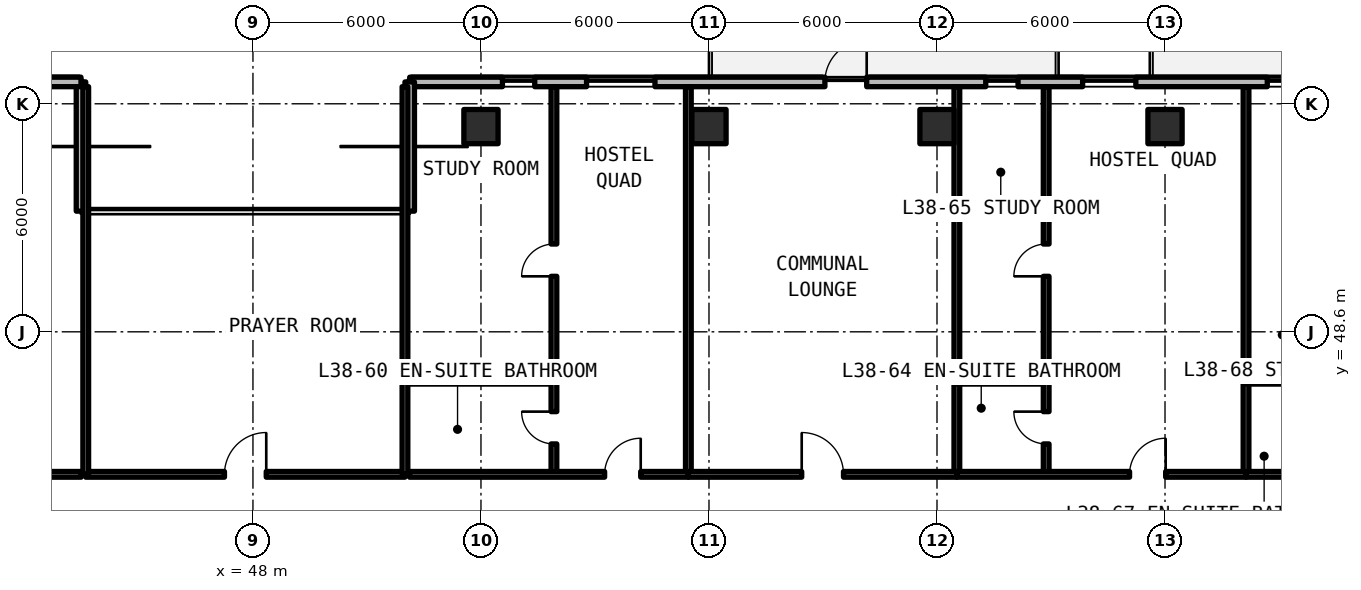
"""IFC4 building model, lengths in metres.
Left out: names, types, materials, properties, quantities, classifications, styles, units other than length and angle.
Written with IfcOpenShell. Run it as: python <this file> out.ifc"""

import sys

from ifc_helpers import new_model, si_unit, direction, frame, frame_2d, origin, origin_2d, place, context, subcontext, project, spatial, rectangle, extrude, element, fill, save


model = new_model("IFC4")
c1 = context("Model", 3, precision=1e-05, world=origin(), true_north=direction((0.0, 1.0)))
c2 = subcontext(c1, "Body", "Model", "MODEL_VIEW")
j1 = project(units=[si_unit("LENGTHUNIT", "METRE"), si_unit("PLANEANGLEUNIT", "RADIAN")], contexts=[c1])
p1 = place(None, origin())
s1 = spatial("IfcSite", under=j1, at=p1, CompositionType="ELEMENT")
p2 = place(p1, origin())
s2 = spatial("IfcBuilding", under=s1, at=p2, CompositionType="ELEMENT")
p3 = place(p2, frame((0.0, 0.0, 138.6)))
s3 = spatial("IfcBuildingStorey", under=s2, at=p3, CompositionType="ELEMENT", Elevation=138.6)
for number, where, z_axis, x_axis in (
    (1, (54.0, 54.0, 0.0), (0.0, 0.0, 1.0), (1.0, 0.0, 0.0)),
    (2, (60.0, 54.0, 0.0), (0.0, 0.0, 1.0), (1.0, 0.0, 0.0)),
    (3, (66.0, 54.0, 0.0), (0.0, 0.0, 1.0), (1.0, 0.0, 0.0)),
    (4, (72.0, 54.0, 0.0), (0.0, 0.0, 1.0), (1.0, 0.0, 0.0)),
):
    element("IfcColumn", number, at=place(p3, frame(where, z_axis=z_axis, x_axis=x_axis)), inside=s3, PredefinedType="COLUMN", context=c2, shape_type="SweptSolid", body=[
        extrude(rectangle(XDim=0.9, YDim=0.9, at=origin_2d()), origin(), (0.0, 0.0, 1.0), 3.3),
    ])
p4 = place(p3, frame((95.748, 55.175, 0.0), z_axis=(0.0, 0.0, 1.0), x_axis=(-1.0, 0.0, 0.0)))
e5 = element("IfcWall", 5, at=p4, inside=s3, PredefinedType="SOLIDWALL", context=c2, shape_type="SweptSolid", body=[
    extrude(rectangle(XDim=43.623, YDim=0.25, at=frame_2d((21.812, 0.0))), origin(), (0.0, 0.0, 1.0), 3.08),
])
p5 = place(p4, frame((31.598, 0.0, 0.0)))
e6 = element("IfcOpeningElement", 6, at=p5, cuts=e5, PredefinedType="OPENING", context=c2, shape_type="SweptSolid", body=[
    extrude(rectangle(XDim=1.1, YDim=2.15, at=frame_2d((0.55, 1.075))), frame((0.0, 0.135, 0.0), z_axis=(0.0, -1.0, 0.0), x_axis=(1.0, 0.0, 0.0)), (0.0, 0.0, 1.0), 0.27),
])
p6 = place(p4, frame((15.398, 0.0, 0.0)))
e7 = element("IfcOpeningElement", 7, at=p6, cuts=e5, PredefinedType="OPENING", context=c2, shape_type="SweptSolid", body=[
    extrude(rectangle(XDim=1.1, YDim=2.15, at=frame_2d((0.55, 1.075))), frame((0.0, 0.135, 0.0), z_axis=(0.0, -1.0, 0.0), x_axis=(1.0, 0.0, 0.0)), (0.0, 0.0, 1.0), 0.27),
])
p7 = place(p4, frame((40.333, 0.0, 0.78)))
e8 = element("IfcOpeningElement", 8, at=p7, cuts=e5, PredefinedType="OPENING", context=c2, shape_type="SweptSolid", body=[
    extrude(rectangle(XDim=0.85, YDim=1.65, at=frame_2d((0.425, 0.825))), frame((0.0, 0.135, 0.0), z_axis=(0.0, -1.0, 0.0), x_axis=(1.0, 0.0, 0.0)), (0.0, 0.0, 1.0), 0.27),
])
p8 = place(p4, frame((37.17, 0.0, 0.78)))
e9 = element("IfcOpeningElement", 9, at=p8, cuts=e5, PredefinedType="OPENING", context=c2, shape_type="SweptSolid", body=[
    extrude(rectangle(XDim=1.8, YDim=1.66, at=frame_2d((0.9, 0.83))), frame((0.0, 0.135, 0.0), z_axis=(0.0, -1.0, 0.0), x_axis=(1.0, 0.0, 0.0)), (0.0, 0.0, 1.0), 0.27),
])
p9 = place(p4, frame((27.615, 0.0, 0.78)))
e10 = element("IfcOpeningElement", 10, at=p9, cuts=e5, PredefinedType="OPENING", context=c2, shape_type="SweptSolid", body=[
    extrude(rectangle(XDim=0.85, YDim=1.65, at=frame_2d((0.425, 0.825))), frame((0.0, 0.135, 0.0), z_axis=(0.0, -1.0, 0.0), x_axis=(1.0, 0.0, 0.0)), (0.0, 0.0, 1.0), 0.27),
])
p10 = place(p4, frame((24.516, 0.0, 0.78)))
e11 = element("IfcOpeningElement", 11, at=p10, cuts=e5, PredefinedType="OPENING", context=c2, shape_type="SweptSolid", body=[
    extrude(rectangle(XDim=1.4, YDim=1.65, at=frame_2d((0.7, 0.825))), frame((0.0, 0.135, 0.0), z_axis=(0.0, -1.0, 0.0), x_axis=(1.0, 0.0, 0.0)), (0.0, 0.0, 1.0), 0.27),
])
p11 = place(p4, frame((20.208, 0.0, 0.78)))
e12 = element("IfcOpeningElement", 12, at=p11, cuts=e5, PredefinedType="OPENING", context=c2, shape_type="SweptSolid", body=[
    extrude(rectangle(XDim=0.85, YDim=1.65, at=frame_2d((0.425, 0.825))), frame((0.0, 0.135, 0.0), z_axis=(0.0, -1.0, 0.0), x_axis=(1.0, 0.0, 0.0)), (0.0, 0.0, 1.0), 0.27),
])
p12 = place(p4, frame((12.6, 0.0, 0.78)))
e13 = element("IfcOpeningElement", 13, at=p12, cuts=e5, PredefinedType="OPENING", context=c2, shape_type="SweptSolid", body=[
    extrude(rectangle(XDim=1.4, YDim=1.65, at=frame_2d((0.7, 0.825))), frame((0.0, 0.135, 0.0), z_axis=(0.0, -1.0, 0.0), x_axis=(1.0, 0.0, 0.0)), (0.0, 0.0, 1.0), 0.27),
])
p13 = place(p4, frame((7.831, 0.0, 0.78)))
e14 = element("IfcOpeningElement", 14, at=p13, cuts=e5, PredefinedType="OPENING", context=c2, shape_type="SweptSolid", body=[
    extrude(rectangle(XDim=1.4, YDim=1.65, at=frame_2d((0.7, 0.825))), frame((0.0, 0.135, 0.0), z_axis=(0.0, -1.0, 0.0), x_axis=(1.0, 0.0, 0.0)), (0.0, 0.0, 1.0), 0.27),
])
p14 = place(p4, frame((4.286, 0.0, 0.78)))
e15 = element("IfcOpeningElement", 15, at=p14, cuts=e5, PredefinedType="OPENING", context=c2, shape_type="SweptSolid", body=[
    extrude(rectangle(XDim=0.85, YDim=1.65, at=frame_2d((0.425, 0.825))), frame((0.0, 0.135, 0.0), z_axis=(0.0, -1.0, 0.0), x_axis=(1.0, 0.0, 0.0)), (0.0, 0.0, 1.0), 0.27),
])
p15 = place(p4, frame((1.098, 0.0, 0.78)))
e16 = element("IfcOpeningElement", 16, at=p15, cuts=e5, PredefinedType="OPENING", context=c2, shape_type="SweptSolid", body=[
    extrude(rectangle(XDim=1.8, YDim=1.66, at=frame_2d((0.9, 0.83))), frame((0.0, 0.135, 0.0), z_axis=(0.0, -1.0, 0.0), x_axis=(1.0, 0.0, 0.0)), (0.0, 0.0, 1.0), 0.27),
])
for number, where, z_axis, x_axis in (
    (17, (52.125, 55.175, 0.0), (0.0, 0.0, 1.0), (0.0, -1.0, 0.0)),
    (18, (43.475, 51.775, 0.0), (0.0, 0.0, 1.0), (0.0, 1.0, 0.0)),
):
    element("IfcWall", number, at=place(p3, frame(where, z_axis=z_axis, x_axis=x_axis)), inside=s3, PredefinedType="SOLIDWALL", context=c2, shape_type="SweptSolid", body=[
        extrude(rectangle(XDim=3.4, YDim=0.25, at=frame_2d((1.7, 0.0))), origin(), (0.0, 0.0, 1.0), 3.08),
    ])
p16 = place(p3, frame((43.475, 55.175, 0.0), z_axis=(0.0, 0.0, 1.0), x_axis=(-1.0, 0.0, 0.0)))
e19 = element("IfcWall", 19, at=p16, inside=s3, PredefinedType="SOLIDWALL", context=c2, shape_type="SweptSolid", body=[
    extrude(rectangle(XDim=19.623, YDim=0.25, at=frame_2d((9.812, 0.0))), origin(), (0.0, 0.0, 1.0), 3.08),
])
p17 = place(p16, frame((15.375, 0.0, 0.0)))
e20 = element("IfcOpeningElement", 20, at=p17, cuts=e19, PredefinedType="OPENING", context=c2, shape_type="SweptSolid", body=[
    extrude(rectangle(XDim=1.1, YDim=2.15, at=frame_2d((0.55, 1.075))), frame((0.0, 0.135, 0.0), z_axis=(0.0, -1.0, 0.0), x_axis=(1.0, 0.0, 0.0)), (0.0, 0.0, 1.0), 0.27),
])
p18 = place(p16, frame((18.08, 0.0, 0.78)))
e21 = element("IfcOpeningElement", 21, at=p18, cuts=e19, PredefinedType="OPENING", context=c2, shape_type="SweptSolid", body=[
    extrude(rectangle(XDim=0.85, YDim=1.65, at=frame_2d((0.425, 0.825))), frame((0.0, 0.135, 0.0), z_axis=(0.0, -1.0, 0.0), x_axis=(1.0, 0.0, 0.0)), (0.0, 0.0, 1.0), 0.27),
])
p19 = place(p16, frame((10.904, 0.0, 0.78)))
e22 = element("IfcOpeningElement", 22, at=p19, cuts=e19, PredefinedType="OPENING", context=c2, shape_type="SweptSolid", body=[
    extrude(rectangle(XDim=1.8, YDim=1.66, at=frame_2d((0.9, 0.83))), frame((0.0, 0.135, 0.0), z_axis=(0.0, -1.0, 0.0), x_axis=(1.0, 0.0, 0.0)), (0.0, 0.0, 1.0), 0.27),
])
p20 = place(p16, frame((5.182, 0.0, 0.78)))
e23 = element("IfcOpeningElement", 23, at=p20, cuts=e19, PredefinedType="OPENING", context=c2, shape_type="SweptSolid", body=[
    extrude(rectangle(XDim=1.4, YDim=1.65, at=frame_2d((0.7, 0.825))), frame((0.0, 0.135, 0.0), z_axis=(0.0, -1.0, 0.0), x_axis=(1.0, 0.0, 0.0)), (0.0, 0.0, 1.0), 0.27),
])
p21 = place(p16, frame((2.392, 0.0, 0.78)))
e24 = element("IfcOpeningElement", 24, at=p21, cuts=e19, PredefinedType="OPENING", context=c2, shape_type="SweptSolid", body=[
    extrude(rectangle(XDim=1.4, YDim=1.65, at=frame_2d((0.7, 0.825))), frame((0.0, 0.135, 0.0), z_axis=(0.0, -1.0, 0.0), x_axis=(1.0, 0.0, 0.0)), (0.0, 0.0, 1.0), 0.27),
])
p22 = place(p3, frame((43.6, 44.85, 0.0), z_axis=(0.0, 0.0, 1.0), x_axis=(1.0, 0.0, 0.0)))
e25 = element("IfcWall", 25, at=p22, inside=s3, PredefinedType="SOLIDWALL", context=c2, shape_type="SweptSolid", body=[
    extrude(rectangle(XDim=8.4, YDim=0.15, at=frame_2d((4.2, 0.0))), origin(), (0.0, 0.0, 1.0), 2.35),
])
p23 = place(p22, frame((3.65, 0.0, 0.0)))
e26 = element("IfcOpeningElement", 26, at=p23, cuts=e25, PredefinedType="OPENING", context=c2, shape_type="SweptSolid", body=[
    extrude(rectangle(XDim=1.1, YDim=2.15, at=frame_2d((0.55, 1.075))), frame((0.0, 0.085, 0.0), z_axis=(0.0, -1.0, 0.0), x_axis=(1.0, 0.0, 0.0)), (0.0, 0.0, 1.0), 0.17),
])
for number, where, z_axis, x_axis in (
    (27, (43.6, 44.85, 0.0), (0.0, 0.0, 1.0), (0.0, 1.0, 0.0)),
    (28, (52.0, 44.85, 0.0), (0.0, 0.0, 1.0), (0.0, 1.0, 0.0)),
):
    element("IfcWall", number, at=place(p3, frame(where, z_axis=z_axis, x_axis=x_axis)), inside=s3, PredefinedType="SOLIDWALL", context=c2, shape_type="SweptSolid", body=[
        extrude(rectangle(XDim=10.2, YDim=0.15, at=frame_2d((5.1, 0.0))), origin(), (0.0, 0.0, 1.0), 2.35),
    ])
p24 = place(p3, frame((38.886, 44.85, 0.0), z_axis=(0.0, 0.0, 1.0), x_axis=(1.0, 0.0, 0.0)))
e29 = element("IfcWall", 29, at=p24, inside=s3, PredefinedType="SOLIDWALL", context=c2, shape_type="SweptSolid", body=[
    extrude(rectangle(XDim=4.594, YDim=0.15, at=frame_2d((2.297, 0.0))), origin(), (0.0, 0.0, 1.0), 2.35),
])
p25 = place(p24, frame((1.822, 0.0, 0.0)))
e30 = element("IfcOpeningElement", 30, at=p25, cuts=e29, PredefinedType="OPENING", context=c2, shape_type="SweptSolid", body=[
    extrude(rectangle(XDim=0.95, YDim=2.15, at=frame_2d((0.475, 1.075))), frame((0.0, 0.085, 0.0), z_axis=(0.0, -1.0, 0.0), x_axis=(1.0, 0.0, 0.0)), (0.0, 0.0, 1.0), 0.17),
])
p26 = place(p3, frame((59.457, 44.85, 0.0), z_axis=(0.0, 0.0, 1.0), x_axis=(0.0, 1.0, 0.0)))
e31 = element("IfcWall", 31, at=p26, inside=s3, PredefinedType="SOLIDWALL", context=c2, shape_type="SweptSolid", body=[
    extrude(rectangle(XDim=10.2, YDim=0.15, at=frame_2d((5.1, 0.0))), origin(), (0.0, 0.0, 1.0), 2.35),
])
p27 = place(p3, frame((52.12, 47.3, 0.0), z_axis=(0.0, 0.0, 1.0), x_axis=(1.0, 0.0, 0.0)))
e32 = element("IfcWall", 32, at=p27, inside=s3, PredefinedType="PARTITIONING", context=c2, shape_type="SweptSolid", body=[
    extrude(rectangle(XDim=3.8, YDim=0.15, at=frame_2d((1.9, 0.0))), origin(), (0.0, 0.0, 1.0), 2.35),
])
p28 = place(p3, frame((55.92, 44.85, 0.0), z_axis=(0.0, 0.0, 1.0), x_axis=(0.0, 1.0, 0.0)))
e33 = element("IfcWall", 33, at=p28, inside=s3, PredefinedType="PARTITIONING", context=c2, shape_type="SweptSolid", body=[
    extrude(rectangle(XDim=10.2, YDim=0.15, at=frame_2d((5.1, 0.0))), origin(), (0.0, 0.0, 1.0), 2.35),
])
p29 = place(p28, frame((0.8, 0.0, 0.0)))
e34 = element("IfcOpeningElement", 34, at=p29, cuts=e33, PredefinedType="OPENING", context=c2, shape_type="SweptSolid", body=[
    extrude(rectangle(XDim=0.85, YDim=2.1, at=frame_2d((0.425, 1.05))), frame((0.0, 0.085, 0.0), z_axis=(0.0, -1.0, 0.0), x_axis=(1.0, 0.0, 0.0)), (0.0, 0.0, 1.0), 0.17),
])
p30 = place(p28, frame((5.21, 0.0, 0.0)))
e35 = element("IfcOpeningElement", 35, at=p30, cuts=e33, PredefinedType="OPENING", context=c2, shape_type="SweptSolid", body=[
    extrude(rectangle(XDim=0.85, YDim=2.1, at=frame_2d((0.425, 1.05))), frame((0.0, 0.085, 0.0), z_axis=(0.0, -1.0, 0.0), x_axis=(1.0, 0.0, 0.0)), (0.0, 0.0, 1.0), 0.17),
])
p31 = place(p3, frame((52.12, 44.85, 0.0), z_axis=(0.0, 0.0, 1.0), x_axis=(1.0, 0.0, 0.0)))
e36 = element("IfcWall", 36, at=p31, inside=s3, PredefinedType="SOLIDWALL", context=c2, shape_type="SweptSolid", body=[
    extrude(rectangle(XDim=7.337, YDim=0.15, at=frame_2d((3.668, 0.0))), origin(), (0.0, 0.0, 1.0), 2.35),
])
p32 = place(p31, frame((5.134, 0.0, 0.0)))
e37 = element("IfcOpeningElement", 37, at=p32, cuts=e36, PredefinedType="OPENING", context=c2, shape_type="SweptSolid", body=[
    extrude(rectangle(XDim=0.95, YDim=2.15, at=frame_2d((0.475, 1.075))), frame((0.0, 0.085, 0.0), z_axis=(0.0, -1.0, 0.0), x_axis=(1.0, 0.0, 0.0)), (0.0, 0.0, 1.0), 0.17),
])
p33 = place(p3, frame((66.523, 44.85, 0.0), z_axis=(0.0, 0.0, 1.0), x_axis=(0.0, 1.0, 0.0)))
e38 = element("IfcWall", 38, at=p33, inside=s3, PredefinedType="SOLIDWALL", context=c2, shape_type="SweptSolid", body=[
    extrude(rectangle(XDim=10.2, YDim=0.15, at=frame_2d((5.1, 0.0))), origin(), (0.0, 0.0, 1.0), 2.35),
])
p34 = place(p3, frame((59.457, 44.85, 0.0), z_axis=(0.0, 0.0, 1.0), x_axis=(1.0, 0.0, 0.0)))
e39 = element("IfcWall", 39, at=p34, inside=s3, PredefinedType="SOLIDWALL", context=c2, shape_type="SweptSolid", body=[
    extrude(rectangle(XDim=7.065, YDim=0.15, at=frame_2d((3.533, 0.0))), origin(), (0.0, 0.0, 1.0), 2.35),
])
p35 = place(p34, frame((2.983, 0.0, 0.0)))
e40 = element("IfcOpeningElement", 40, at=p35, cuts=e39, PredefinedType="OPENING", context=c2, shape_type="SweptSolid", body=[
    extrude(rectangle(XDim=1.1, YDim=2.15, at=frame_2d((0.55, 1.075))), frame((0.0, 0.085, 0.0), z_axis=(0.0, -1.0, 0.0), x_axis=(1.0, 0.0, 0.0)), (0.0, 0.0, 1.0), 0.17),
])
p36 = place(p3, frame((74.132, 44.85, 0.0), z_axis=(0.0, 0.0, 1.0), x_axis=(0.0, 1.0, 0.0)))
e41 = element("IfcWall", 41, at=p36, inside=s3, PredefinedType="SOLIDWALL", context=c2, shape_type="SweptSolid", body=[
    extrude(rectangle(XDim=10.2, YDim=0.15, at=frame_2d((5.1, 0.0))), origin(), (0.0, 0.0, 1.0), 2.35),
])
p37 = place(p3, frame((66.523, 47.3, 0.0), z_axis=(0.0, 0.0, 1.0), x_axis=(1.0, 0.0, 0.0)))
e42 = element("IfcWall", 42, at=p37, inside=s3, PredefinedType="PARTITIONING", context=c2, shape_type="SweptSolid", body=[
    extrude(rectangle(XDim=2.35, YDim=0.15, at=frame_2d((1.175, 0.0))), origin(), (0.0, 0.0, 1.0), 2.35),
])
p38 = place(p3, frame((68.873, 44.85, 0.0), z_axis=(0.0, 0.0, 1.0), x_axis=(0.0, 1.0, 0.0)))
e43 = element("IfcWall", 43, at=p38, inside=s3, PredefinedType="PARTITIONING", context=c2, shape_type="SweptSolid", body=[
    extrude(rectangle(XDim=10.2, YDim=0.15, at=frame_2d((5.1, 0.0))), origin(), (0.0, 0.0, 1.0), 2.35),
])
p39 = place(p38, frame((0.8, 0.0, 0.0)))
e44 = element("IfcOpeningElement", 44, at=p39, cuts=e43, PredefinedType="OPENING", context=c2, shape_type="SweptSolid", body=[
    extrude(rectangle(XDim=0.85, YDim=2.1, at=frame_2d((0.425, 1.05))), frame((0.0, 0.085, 0.0), z_axis=(0.0, -1.0, 0.0), x_axis=(1.0, 0.0, 0.0)), (0.0, 0.0, 1.0), 0.17),
])
p40 = place(p38, frame((5.21, 0.0, 0.0)))
e45 = element("IfcOpeningElement", 45, at=p40, cuts=e43, PredefinedType="OPENING", context=c2, shape_type="SweptSolid", body=[
    extrude(rectangle(XDim=0.85, YDim=2.1, at=frame_2d((0.425, 1.05))), frame((0.0, 0.085, 0.0), z_axis=(0.0, -1.0, 0.0), x_axis=(1.0, 0.0, 0.0)), (0.0, 0.0, 1.0), 0.17),
])
p41 = place(p3, frame((66.523, 44.85, 0.0), z_axis=(0.0, 0.0, 1.0), x_axis=(1.0, 0.0, 0.0)))
e46 = element("IfcWall", 46, at=p41, inside=s3, PredefinedType="SOLIDWALL", context=c2, shape_type="SweptSolid", body=[
    extrude(rectangle(XDim=7.609, YDim=0.15, at=frame_2d((3.804, 0.0))), origin(), (0.0, 0.0, 1.0), 2.35),
])
p42 = place(p41, frame((4.544, 0.0, 0.0)))
e47 = element("IfcOpeningElement", 47, at=p42, cuts=e46, PredefinedType="OPENING", context=c2, shape_type="SweptSolid", body=[
    extrude(rectangle(XDim=0.95, YDim=2.15, at=frame_2d((0.475, 1.075))), frame((0.0, 0.085, 0.0), z_axis=(0.0, -1.0, 0.0), x_axis=(1.0, 0.0, 0.0)), (0.0, 0.0, 1.0), 0.17),
])
p43 = place(p3, frame((74.132, 47.3, 0.0), z_axis=(0.0, 0.0, 1.0), x_axis=(1.0, 0.0, 0.0)))
e48 = element("IfcWall", 48, at=p43, inside=s3, PredefinedType="PARTITIONING", context=c2, shape_type="SweptSolid", body=[
    extrude(rectangle(XDim=1.948, YDim=0.15, at=frame_2d((0.974, 0.0))), origin(), (0.0, 0.0, 1.0), 2.35),
])
p44 = place(p3, frame((74.132, 44.85, 0.0), z_axis=(0.0, 0.0, 1.0), x_axis=(1.0, 0.0, 0.0)))
e49 = element("IfcWall", 49, at=p44, inside=s3, PredefinedType="SOLIDWALL", context=c2, shape_type="SweptSolid", body=[
    extrude(rectangle(XDim=7.066, YDim=0.15, at=frame_2d((3.533, 0.0))), origin(), (0.0, 0.0, 1.0), 2.35),
])
p45 = place(p44, frame((4.072, 0.0, 0.0)))
e50 = element("IfcOpeningElement", 50, at=p45, cuts=e49, PredefinedType="OPENING", context=c2, shape_type="SweptSolid", body=[
    extrude(rectangle(XDim=0.95, YDim=2.15, at=frame_2d((0.475, 1.075))), frame((0.0, 0.085, 0.0), z_axis=(0.0, -1.0, 0.0), x_axis=(1.0, 0.0, 0.0)), (0.0, 0.0, 1.0), 0.17),
])
p46 = place(p5, frame((1.1, 0.0, 0.0), z_axis=(0.0, 0.0, 1.0), x_axis=(-1.0, 0.0, 0.0)))
e51 = element("IfcDoor", 51, at=p46, inside=s3, OperationType="SINGLE_SWING_RIGHT", PredefinedType="DOOR", context=c2, shape_type="SweptSolid", body=[
    extrude(rectangle(XDim=1.1, YDim=2.15, at=frame_2d((0.55, 1.075))), frame((0.0, 0.025, 0.0), z_axis=(0.0, -1.0, 0.0), x_axis=(1.0, 0.0, 0.0)), (0.0, 0.0, 1.0), 0.05),
])
fill(e6, e51)
p47 = place(p7, origin())
e52 = element("IfcWindow", 52, at=p47, inside=s3, PartitioningType="SINGLE_PANEL", PredefinedType="WINDOW", context=c2, shape_type="SweptSolid", body=[
    extrude(rectangle(XDim=0.85, YDim=1.65, at=frame_2d((0.425, 0.825))), frame((0.0, 0.03, 0.0), z_axis=(0.0, -1.0, 0.0), x_axis=(1.0, 0.0, 0.0)), (0.0, 0.0, 1.0), 0.06),
])
fill(e8, e52)
p48 = place(p8, origin())
e53 = element("IfcWindow", 53, at=p48, inside=s3, PartitioningType="SINGLE_PANEL", PredefinedType="WINDOW", context=c2, shape_type="SweptSolid", body=[
    extrude(rectangle(XDim=1.8, YDim=1.66, at=frame_2d((0.9, 0.83))), frame((0.0, 0.03, 0.0), z_axis=(0.0, -1.0, 0.0), x_axis=(1.0, 0.0, 0.0)), (0.0, 0.0, 1.0), 0.06),
])
fill(e9, e53)
p49 = place(p9, origin())
e54 = element("IfcWindow", 54, at=p49, inside=s3, PartitioningType="SINGLE_PANEL", PredefinedType="WINDOW", context=c2, shape_type="SweptSolid", body=[
    extrude(rectangle(XDim=0.85, YDim=1.65, at=frame_2d((0.425, 0.825))), frame((0.0, 0.03, 0.0), z_axis=(0.0, -1.0, 0.0), x_axis=(1.0, 0.0, 0.0)), (0.0, 0.0, 1.0), 0.06),
])
fill(e10, e54)
p50 = place(p10, origin())
e55 = element("IfcWindow", 55, at=p50, inside=s3, PartitioningType="SINGLE_PANEL", PredefinedType="WINDOW", context=c2, shape_type="SweptSolid", body=[
    extrude(rectangle(XDim=1.4, YDim=1.65, at=frame_2d((0.7, 0.825))), frame((0.0, 0.03, 0.0), z_axis=(0.0, -1.0, 0.0), x_axis=(1.0, 0.0, 0.0)), (0.0, 0.0, 1.0), 0.06),
])
fill(e11, e55)
p51 = place(p11, origin())
e56 = element("IfcWindow", 56, at=p51, inside=s3, PartitioningType="SINGLE_PANEL", PredefinedType="WINDOW", context=c2, shape_type="SweptSolid", body=[
    extrude(rectangle(XDim=0.85, YDim=1.65, at=frame_2d((0.425, 0.825))), frame((0.0, 0.03, 0.0), z_axis=(0.0, -1.0, 0.0), x_axis=(1.0, 0.0, 0.0)), (0.0, 0.0, 1.0), 0.06),
])
fill(e12, e56)
p52 = place(p23, origin())
e57 = element("IfcDoor", 57, at=p52, inside=s3, OperationType="SINGLE_SWING_RIGHT", PredefinedType="DOOR", context=c2, shape_type="SweptSolid", body=[
    extrude(rectangle(XDim=1.1, YDim=2.15, at=frame_2d((0.55, 1.075))), frame((0.0, 0.025, 0.0), z_axis=(0.0, -1.0, 0.0), x_axis=(1.0, 0.0, 0.0)), (0.0, 0.0, 1.0), 0.05),
])
fill(e26, e57)
p53 = place(p29, origin())
e58 = element("IfcDoor", 58, at=p53, inside=s3, OperationType="SINGLE_SWING_RIGHT", PredefinedType="DOOR", context=c2, shape_type="SweptSolid", body=[
    extrude(rectangle(XDim=0.85, YDim=2.1, at=frame_2d((0.425, 1.05))), frame((0.0, 0.025, 0.0), z_axis=(0.0, -1.0, 0.0), x_axis=(1.0, 0.0, 0.0)), (0.0, 0.0, 1.0), 0.05),
])
fill(e34, e58)
p54 = place(p30, origin())
e59 = element("IfcDoor", 59, at=p54, inside=s3, OperationType="SINGLE_SWING_LEFT", PredefinedType="DOOR", context=c2, shape_type="SweptSolid", body=[
    extrude(rectangle(XDim=0.85, YDim=2.1, at=frame_2d((0.425, 1.05))), frame((0.0, 0.025, 0.0), z_axis=(0.0, -1.0, 0.0), x_axis=(1.0, 0.0, 0.0)), (0.0, 0.0, 1.0), 0.05),
])
fill(e35, e59)
p55 = place(p32, origin())
e60 = element("IfcDoor", 60, at=p55, inside=s3, OperationType="SINGLE_SWING_RIGHT", PredefinedType="DOOR", context=c2, shape_type="SweptSolid", body=[
    extrude(rectangle(XDim=0.95, YDim=2.15, at=frame_2d((0.475, 1.075))), frame((0.0, 0.025, 0.0), z_axis=(0.0, -1.0, 0.0), x_axis=(1.0, 0.0, 0.0)), (0.0, 0.0, 1.0), 0.05),
])
fill(e37, e60)
p56 = place(p35, origin())
e61 = element("IfcDoor", 61, at=p56, inside=s3, OperationType="SINGLE_SWING_LEFT", PredefinedType="DOOR", context=c2, shape_type="SweptSolid", body=[
    extrude(rectangle(XDim=1.1, YDim=2.15, at=frame_2d((0.55, 1.075))), frame((0.0, 0.025, 0.0), z_axis=(0.0, -1.0, 0.0), x_axis=(1.0, 0.0, 0.0)), (0.0, 0.0, 1.0), 0.05),
])
fill(e40, e61)
p57 = place(p39, origin())
e62 = element("IfcDoor", 62, at=p57, inside=s3, OperationType="SINGLE_SWING_RIGHT", PredefinedType="DOOR", context=c2, shape_type="SweptSolid", body=[
    extrude(rectangle(XDim=0.85, YDim=2.1, at=frame_2d((0.425, 1.05))), frame((0.0, 0.025, 0.0), z_axis=(0.0, -1.0, 0.0), x_axis=(1.0, 0.0, 0.0)), (0.0, 0.0, 1.0), 0.05),
])
fill(e44, e62)
p58 = place(p40, origin())
e63 = element("IfcDoor", 63, at=p58, inside=s3, OperationType="SINGLE_SWING_LEFT", PredefinedType="DOOR", context=c2, shape_type="SweptSolid", body=[
    extrude(rectangle(XDim=0.85, YDim=2.1, at=frame_2d((0.425, 1.05))), frame((0.0, 0.025, 0.0), z_axis=(0.0, -1.0, 0.0), x_axis=(1.0, 0.0, 0.0)), (0.0, 0.0, 1.0), 0.05),
])
fill(e45, e63)
p59 = place(p42, origin())
e64 = element("IfcDoor", 64, at=p59, inside=s3, OperationType="SINGLE_SWING_RIGHT", PredefinedType="DOOR", context=c2, shape_type="SweptSolid", body=[
    extrude(rectangle(XDim=0.95, YDim=2.15, at=frame_2d((0.475, 1.075))), frame((0.0, 0.025, 0.0), z_axis=(0.0, -1.0, 0.0), x_axis=(1.0, 0.0, 0.0)), (0.0, 0.0, 1.0), 0.05),
])
fill(e47, e64)
save(model, sys.argv[1])
